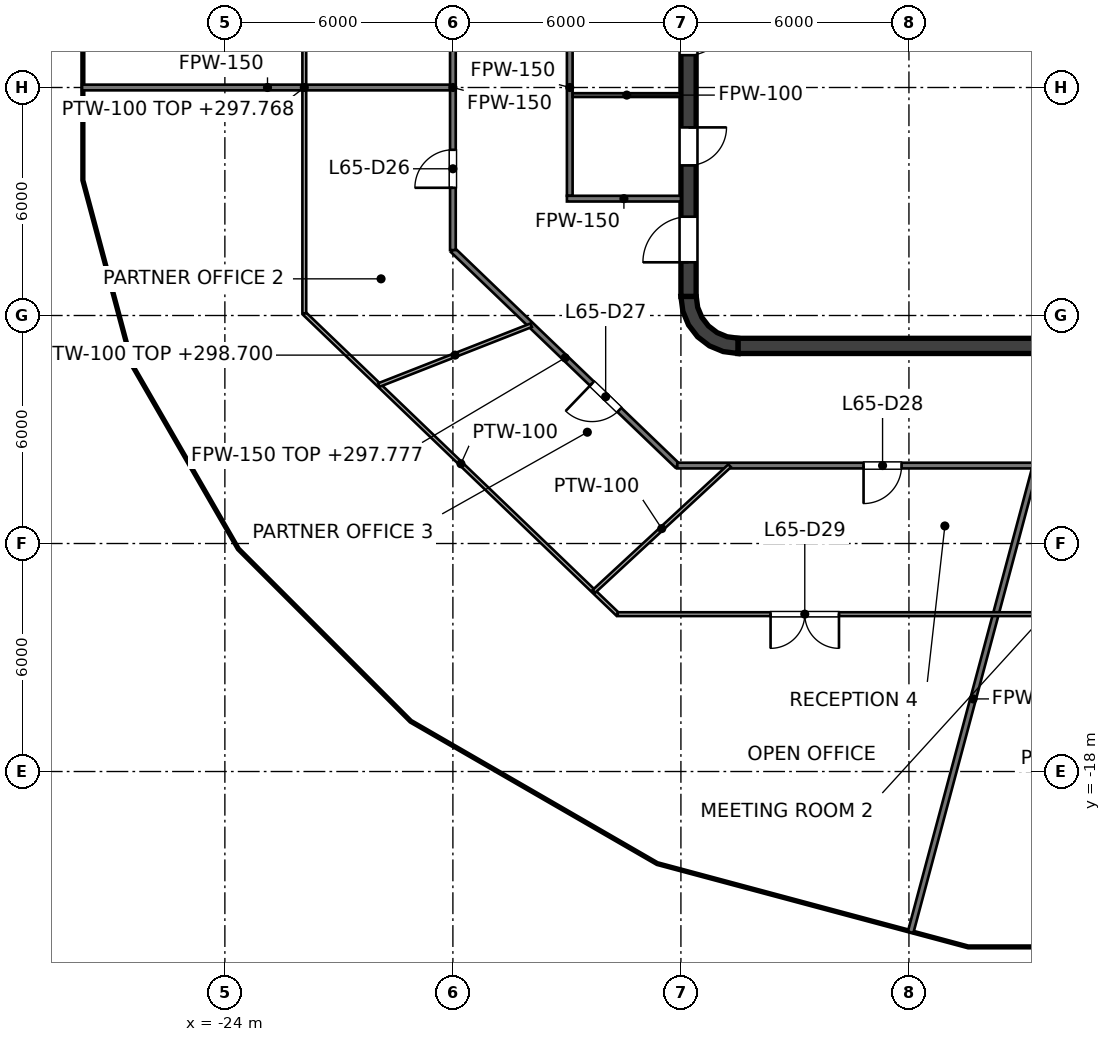
"""IFC4 building model, lengths in metres.
Left out: names, types, materials, properties, quantities, classifications, styles, units other than length and angle.
Written with IfcOpenShell. Run it as: python <this file> out.ifc"""

import sys

from ifc_helpers import new_model, si_unit, direction, frame, frame_2d, origin, place, context, subcontext, project, spatial, polyline, rectangle, outline, extrude, element, fill, save


model = new_model("IFC4")
c1 = context("Model", 3, precision=1e-05, world=origin(), true_north=direction((0.0, 1.0)))
c2 = subcontext(c1, "Body", "Model", "MODEL_VIEW")
j1 = project(units=[si_unit("LENGTHUNIT", "METRE"), si_unit("PLANEANGLEUNIT", "RADIAN")], contexts=[c1])
p1 = place(None, origin())
s1 = spatial("IfcSite", under=j1, at=p1, CompositionType="ELEMENT")
p2 = place(p1, origin())
s2 = spatial("IfcBuilding", under=s1, at=p2, CompositionType="ELEMENT")
p3 = place(p2, frame((0.0, 0.0, 295.0)))
s3 = spatial("IfcBuildingStorey", under=s2, at=p3, CompositionType="ELEMENT", Elevation=295.0)
p4 = place(p3, frame((-10.5, -6.8, 0.0), z_axis=(0.0, 0.0, 1.0), x_axis=(1.0, 0.0, 0.0)))
e1 = element("IfcWall", 1, at=p4, inside=s3, PredefinedType="SHEAR", context=c2, shape_type="SweptSolid", body=[
    extrude(rectangle(XDim=21.0, YDim=0.4, at=frame_2d((10.5, 0.0))), origin(), (0.0, 0.0, 1.0), 4.0),
])
p5 = place(p3, frame((-11.8, -5.5, 0.0), z_axis=(0.0, 0.0, 1.0), x_axis=(0.0, 1.0, 0.0)))
e2 = element("IfcWall", 2, at=p5, inside=s3, PredefinedType="SHEAR", context=c2, shape_type="SweptSolid", body=[
    extrude(rectangle(XDim=11.0, YDim=0.4, at=frame_2d((5.5, 0.0))), origin(), (0.0, 0.0, 1.0), 4.0),
])
p6 = place(p5, frame((3.45, 0.0, 0.0)))
e3 = element("IfcOpeningElement", 3, at=p6, cuts=e2, PredefinedType="OPENING", context=c2, shape_type="SweptSolid", body=[
    extrude(rectangle(XDim=1.0, YDim=2.1, at=frame_2d((0.5, 1.05))), frame((0.0, 0.2, 0.0), z_axis=(0.0, -1.0, 0.0), x_axis=(1.0, 0.0, 0.0)), (0.0, 0.0, 1.0), 0.4),
])
p7 = place(p5, frame((6.35, 0.0, 0.0)))
e4 = element("IfcOpeningElement", 4, at=p7, cuts=e2, PredefinedType="OPENING", context=c2, shape_type="SweptSolid", body=[
    extrude(rectangle(XDim=1.0, YDim=2.1, at=frame_2d((0.5, 1.05))), frame((0.0, 0.2, 0.0), z_axis=(0.0, -1.0, 0.0), x_axis=(1.0, 0.0, 0.0)), (0.0, 0.0, 1.0), 0.4),
])
p8 = place(p5, frame((0.9, 0.0, 0.0)))
e5 = element("IfcOpeningElement", 5, at=p8, cuts=e2, PredefinedType="OPENING", context=c2, shape_type="SweptSolid", body=[
    extrude(rectangle(XDim=1.2, YDim=2.1, at=frame_2d((0.6, 1.05))), frame((0.0, 0.2, 0.0), z_axis=(0.0, -1.0, 0.0), x_axis=(1.0, 0.0, 0.0)), (0.0, 0.0, 1.0), 0.4),
])
p9 = place(p5, frame((8.9, 0.0, 0.0)))
e6 = element("IfcOpeningElement", 6, at=p9, cuts=e2, PredefinedType="OPENING", context=c2, shape_type="SweptSolid", body=[
    extrude(rectangle(XDim=1.2, YDim=2.1, at=frame_2d((0.6, 1.05))), frame((0.0, 0.2, 0.0), z_axis=(0.0, -1.0, 0.0), x_axis=(1.0, 0.0, 0.0)), (0.0, 0.0, 1.0), 0.4),
])
p10 = place(p3, origin())
e7 = element("IfcWall", 7, at=p10, inside=s3, PredefinedType="SHEAR", context=c2, shape_type="SweptSolid", body=[
    extrude(outline(polyline([(-10.5, -7.0), (-10.5, -6.596), (-10.784, -6.559), (-11.048, -6.45), (-11.275, -6.275), (-11.45, -6.048), (-11.559, -5.784), (-11.596, -5.5), (-12.0, -5.5), (-11.949, -5.888), (-11.799, -6.25), (-11.561, -6.561), (-11.25, -6.799), (-10.888, -6.949), (-10.5, -7.0)])), origin(), (0.0, 0.0, 1.0), 4.0),
])
p11 = place(p3, frame((-9.0, -6.6, 0.0), z_axis=(0.0, 0.0, 1.0), x_axis=(0.0, 1.0, 0.0)))
e8 = element("IfcWall", 8, at=p11, inside=s3, PredefinedType="PARTITIONING", context=c2, shape_type="SweptSolid", body=[
    extrude(rectangle(XDim=2.5, YDim=0.25, at=frame_2d((1.25, 0.0))), origin(), (0.0, 0.0, 1.0), 3.7),
])
p12 = place(p11, frame((0.75, 0.0, 0.0)))
e9 = element("IfcOpeningElement", 9, at=p12, cuts=e8, PredefinedType="OPENING", context=c2, shape_type="SweptSolid", body=[
    extrude(rectangle(XDim=1.0, YDim=2.1, at=frame_2d((0.5, 1.05))), frame((0.0, 0.125, 0.0), z_axis=(0.0, -1.0, 0.0), x_axis=(1.0, 0.0, 0.0)), (0.0, 0.0, 1.0), 0.25),
])
p13 = place(p3, frame((-2.9, -6.6, 0.0), z_axis=(0.0, 0.0, 1.0), x_axis=(0.0, 1.0, 0.0)))
e10 = element("IfcWall", 10, at=p13, inside=s3, PredefinedType="PARTITIONING", context=c2, shape_type="SweptSolid", body=[
    extrude(rectangle(XDim=2.5, YDim=0.25, at=frame_2d((1.25, 0.0))), origin(), (0.0, 0.0, 1.0), 3.7),
])
p14 = place(p13, frame((0.8, 0.0, 0.0)))
e11 = element("IfcOpeningElement", 11, at=p14, cuts=e10, PredefinedType="OPENING", context=c2, shape_type="SweptSolid", body=[
    extrude(rectangle(XDim=0.9, YDim=2.1, at=frame_2d((0.45, 1.05))), frame((0.0, 0.125, 0.0), z_axis=(0.0, -1.0, 0.0), x_axis=(1.0, 0.0, 0.0)), (0.0, 0.0, 1.0), 0.25),
])
p15 = place(p3, frame((-9.125, -1.525, 0.0), z_axis=(0.0, 0.0, 1.0), x_axis=(1.0, 0.0, 0.0)))
e12 = element("IfcWall", 12, at=p15, inside=s3, PredefinedType="SOLIDWALL", context=c2, shape_type="SweptSolid", body=[
    extrude(rectangle(XDim=18.25, YDim=0.25, at=frame_2d((9.125, 0.0))), origin(), (0.0, 0.0, 1.0), 3.7),
])
p16 = place(p15, frame((7.15, 0.0, 0.0)))
e13 = element("IfcOpeningElement", 13, at=p16, cuts=e12, PredefinedType="OPENING", context=c2, shape_type="SweptSolid", body=[
    extrude(rectangle(XDim=1.2, YDim=2.1, at=frame_2d((0.6, 1.05))), frame((0.0, 0.125, 0.0), z_axis=(0.0, -1.0, 0.0), x_axis=(1.0, 0.0, 0.0)), (0.0, 0.0, 1.0), 0.25),
])
p17 = place(p15, frame((10.2, 0.0, 0.0)))
e14 = element("IfcOpeningElement", 14, at=p17, cuts=e12, PredefinedType="OPENING", context=c2, shape_type="SweptSolid", body=[
    extrude(rectangle(XDim=1.2, YDim=2.1, at=frame_2d((0.6, 1.05))), frame((0.0, 0.125, 0.0), z_axis=(0.0, -1.0, 0.0), x_axis=(1.0, 0.0, 0.0)), (0.0, 0.0, 1.0), 0.25),
])
p18 = place(p15, frame((16.075, 0.0, 0.0)))
e15 = element("IfcOpeningElement", 15, at=p18, cuts=e12, PredefinedType="OPENING", context=c2, shape_type="SweptSolid", body=[
    extrude(rectangle(XDim=1.0, YDim=2.1, at=frame_2d((0.5, 1.05))), frame((0.0, 0.125, 0.0), z_axis=(0.0, -1.0, 0.0), x_axis=(1.0, 0.0, 0.0)), (0.0, 0.0, 1.0), 0.25),
])
p19 = place(p3, frame((-9.125, -3.975, 0.0), z_axis=(0.0, 0.0, 1.0), x_axis=(1.0, 0.0, 0.0)))
e16 = element("IfcWall", 16, at=p19, inside=s3, PredefinedType="SOLIDWALL", context=c2, shape_type="SweptSolid", body=[
    extrude(rectangle(XDim=12.4, YDim=0.25, at=frame_2d((6.2, 0.0))), origin(), (0.0, 0.0, 1.0), 3.7),
])
p20 = place(p19, frame((1.05, 0.0, 0.0)))
e17 = element("IfcOpeningElement", 17, at=p20, cuts=e16, PredefinedType="OPENING", context=c2, shape_type="SweptSolid", body=[
    extrude(rectangle(XDim=1.2, YDim=2.1, at=frame_2d((0.6, 1.05))), frame((0.0, 0.125, 0.0), z_axis=(0.0, -1.0, 0.0), x_axis=(1.0, 0.0, 0.0)), (0.0, 0.0, 1.0), 0.25),
])
p21 = place(p19, frame((4.1, 0.0, 0.0)))
e18 = element("IfcOpeningElement", 18, at=p21, cuts=e16, PredefinedType="OPENING", context=c2, shape_type="SweptSolid", body=[
    extrude(rectangle(XDim=1.2, YDim=2.1, at=frame_2d((0.6, 1.05))), frame((0.0, 0.125, 0.0), z_axis=(0.0, -1.0, 0.0), x_axis=(1.0, 0.0, 0.0)), (0.0, 0.0, 1.0), 0.25),
])
for number, where, z_axis, x_axis in (
    (19, (-9.0, -3.85, 0.0), (0.0, 0.0, 1.0), (0.0, 1.0, 0.0)),
    (20, (-5.95, -3.85, 0.0), (0.0, 0.0, 1.0), (0.0, 1.0, 0.0)),
    (21, (-2.9, -3.85, 0.0), (0.0, 0.0, 1.0), (0.0, 1.0, 0.0)),
):
    element("IfcWall", number, at=place(p3, frame(where, z_axis=z_axis, x_axis=x_axis)), inside=s3, PredefinedType="SOLIDWALL", context=c2, shape_type="SweptSolid", body=[
        extrude(rectangle(XDim=2.2, YDim=0.25, at=frame_2d((1.1, 0.0))), origin(), (0.0, 0.0, 1.0), 3.7),
    ])
p22 = place(p3, frame((-14.925, -2.85, 0.0), z_axis=(0.0, 0.0, 1.0), x_axis=(0.0, 1.0, 0.0)))
e22 = element("IfcWall", 22, at=p22, inside=s3, PredefinedType="PARTITIONING", context=c2, shape_type="SweptSolid", body=[
    extrude(rectangle(XDim=5.7, YDim=0.15, at=frame_2d((2.85, 0.0))), origin(), (0.0, 0.0, 1.0), 2.768),
])
p23 = place(p3, frame((-15.0, -2.925, 0.0), z_axis=(0.0, 0.0, 1.0), x_axis=(1.0, 0.0, 0.0)))
e23 = element("IfcWall", 23, at=p23, inside=s3, PredefinedType="PARTITIONING", context=c2, shape_type="SweptSolid", body=[
    extrude(rectangle(XDim=3.0, YDim=0.15, at=frame_2d((1.5, 0.0))), origin(), (0.0, 0.0, 1.0), 2.768),
])
p24 = place(p3, frame((-14.85, -0.2, 0.0), z_axis=(0.0, 0.0, 1.0), x_axis=(1.0, 0.0, 0.0)))
e24 = element("IfcWall", 24, at=p24, inside=s3, PredefinedType="PARTITIONING", context=c2, shape_type="SweptSolid", body=[
    extrude(rectangle(XDim=2.85, YDim=0.1, at=frame_2d((1.425, 0.0))), origin(), (0.0, 0.0, 1.0), 2.768),
])
p25 = place(p3, frame((-18.0, -4.278, 0.0), z_axis=(0.0, 0.0, 1.0), x_axis=(0.721290181137, -0.692633001376, 0.0)))
e25 = element("IfcWall", 25, at=p25, inside=s3, PredefinedType="PARTITIONING", context=c2, shape_type="SweptSolid", body=[
    extrude(rectangle(XDim=8.187, YDim=0.15, at=frame_2d((4.094, 0.0))), origin(), (0.0, 0.0, 1.0), 2.777),
])
p26 = place(p25, frame((5.073, 0.0, 0.0)))
e26 = element("IfcOpeningElement", 26, at=p26, cuts=e25, PredefinedType="OPENING", context=c2, shape_type="SweptSolid", body=[
    extrude(rectangle(XDim=1.0, YDim=2.1, at=frame_2d((0.5, 1.05))), frame((0.0, 0.075, 0.0), z_axis=(0.0, -1.0, 0.0), x_axis=(1.0, 0.0, 0.0)), (0.0, 0.0, 1.0), 0.15),
])
p27 = place(p3, frame((-12.095, -9.949, 0.0), z_axis=(0.0, 0.0, 1.0), x_axis=(1.0, 0.0, 0.0)))
e27 = element("IfcWall", 27, at=p27, inside=s3, PredefinedType="PARTITIONING", context=c2, shape_type="SweptSolid", body=[
    extrude(rectangle(XDim=24.19, YDim=0.15, at=frame_2d((12.095, 0.0))), origin(), (0.0, 0.0, 1.0), 2.768),
])
p28 = place(p27, frame((4.901, 0.0, 0.0)))
e28 = element("IfcOpeningElement", 28, at=p28, cuts=e27, PredefinedType="OPENING", context=c2, shape_type="SweptSolid", body=[
    extrude(rectangle(XDim=1.0, YDim=2.1, at=frame_2d((0.5, 1.05))), frame((0.0, 0.075, 0.0), z_axis=(0.0, -1.0, 0.0), x_axis=(1.0, 0.0, 0.0)), (0.0, 0.0, 1.0), 0.15),
])
p29 = place(p27, frame((11.05, 0.0, 0.0)))
e29 = element("IfcOpeningElement", 29, at=p29, cuts=e27, PredefinedType="OPENING", context=c2, shape_type="SweptSolid", body=[
    extrude(rectangle(XDim=1.0, YDim=2.1, at=frame_2d((0.5, 1.05))), frame((0.0, 0.075, 0.0), z_axis=(0.0, -1.0, 0.0), x_axis=(1.0, 0.0, 0.0)), (0.0, 0.0, 1.0), 0.15),
])
p30 = place(p27, frame((17.307, 0.0, 0.0)))
e30 = element("IfcOpeningElement", 30, at=p30, cuts=e27, PredefinedType="OPENING", context=c2, shape_type="SweptSolid", body=[
    extrude(rectangle(XDim=1.0, YDim=2.1, at=frame_2d((0.5, 1.05))), frame((0.0, 0.075, 0.0), z_axis=(0.0, -1.0, 0.0), x_axis=(1.0, 0.0, 0.0)), (0.0, 0.0, 1.0), 0.15),
])
p31 = place(p3, frame((-27.757, 0.0, 0.0), z_axis=(0.0, 0.0, 1.0), x_axis=(1.0, 0.0, 0.0)))
e31 = element("IfcWall", 31, at=p31, inside=s3, PredefinedType="PARTITIONING", context=c2, shape_type="SweptSolid", body=[
    extrude(rectangle(XDim=9.757, YDim=0.15, at=frame_2d((4.878, 0.0))), origin(), (0.0, 0.0, 1.0), 2.768),
])
p32 = place(p3, frame((-5.956, -22.23, 0.0), z_axis=(0.0, 0.0, 1.0), x_axis=(0.258735765276, 0.965948137204, 0.0)))
e32 = element("IfcWall", 32, at=p32, inside=s3, PredefinedType="PARTITIONING", context=c2, shape_type="SweptSolid", body=[
    extrude(rectangle(XDim=12.714, YDim=0.15, at=frame_2d((6.357, 0.0))), origin(), (0.0, 0.0, 1.0), 3.152),
])
p33 = place(p3, frame((-18.0, -4.278, 0.0), z_axis=(0.0, 0.0, 1.0), x_axis=(0.0, 1.0, 0.0)))
e33 = element("IfcWall", 33, at=p33, inside=s3, PredefinedType="PARTITIONING", context=c2, shape_type="SweptSolid", body=[
    extrude(rectangle(XDim=8.556, YDim=0.15, at=frame_2d((4.278, 0.0))), origin(), (0.0, 0.0, 1.0), 2.768),
])
p34 = place(p33, frame((1.639, 0.0, 0.0)))
e34 = element("IfcOpeningElement", 34, at=p34, cuts=e33, PredefinedType="OPENING", context=c2, shape_type="SweptSolid", body=[
    extrude(rectangle(XDim=1.0, YDim=2.1, at=frame_2d((0.5, 1.05))), frame((0.0, 0.075, 0.0), z_axis=(0.0, -1.0, 0.0), x_axis=(1.0, 0.0, 0.0)), (0.0, 0.0, 1.0), 0.15),
])
p35 = place(p3, frame((-21.91, -5.944, 0.0), z_axis=(0.0, 0.0, 1.0), x_axis=(0.721286980933, -0.692636333971, 0.0)))
e35 = element("IfcWall", 35, at=p35, inside=s3, PredefinedType="PARTITIONING", context=c2, shape_type="SweptSolid", body=[
    extrude(rectangle(XDim=11.427, YDim=0.1, at=frame_2d((5.713, 0.0))), origin(), (0.0, 0.0, 1.0), 2.777),
])
p36 = place(p3, frame((-13.668, -13.859, 0.0), z_axis=(0.0, 0.0, 1.0), x_axis=(1.0, 0.0, 0.0)))
e36 = element("IfcWall", 36, at=p36, inside=s3, PredefinedType="PARTITIONING", context=c2, shape_type="SweptSolid", body=[
    extrude(rectangle(XDim=27.336, YDim=0.1, at=frame_2d((13.668, 0.0))), origin(), (0.0, 0.0, 1.0), 2.768),
])
p37 = place(p36, frame((4.027, 0.0, 0.0)))
e37 = element("IfcOpeningElement", 37, at=p37, cuts=e36, PredefinedType="OPENING", context=c2, shape_type="SweptSolid", body=[
    extrude(rectangle(XDim=1.8, YDim=2.1, at=frame_2d((0.9, 1.05))), frame((0.0, 0.05, 0.0), z_axis=(0.0, -1.0, 0.0), x_axis=(1.0, 0.0, 0.0)), (0.0, 0.0, 1.0), 0.1),
])
p38 = place(p36, frame((20.699, 0.0, 0.0)))
e38 = element("IfcOpeningElement", 38, at=p38, cuts=e36, PredefinedType="OPENING", context=c2, shape_type="SweptSolid", body=[
    extrude(rectangle(XDim=1.8, YDim=2.1, at=frame_2d((0.9, 1.05))), frame((0.0, 0.05, 0.0), z_axis=(0.0, -1.0, 0.0), x_axis=(1.0, 0.0, 0.0)), (0.0, 0.0, 1.0), 0.1),
])
p39 = place(p3, frame((-19.947, -7.829, 0.0), z_axis=(0.0, 0.0, 1.0), x_axis=(0.930847279984, 0.36540845823, 0.0)))
e39 = element("IfcWall", 39, at=p39, inside=s3, PredefinedType="PARTITIONING", context=c2, shape_type="SweptSolid", body=[
    extrude(rectangle(XDim=4.305, YDim=0.1, at=frame_2d((2.152, 0.0))), origin(), (0.0, 0.0, 1.0), 3.7),
])
p40 = place(p3, frame((-14.291, -13.261, 0.0), z_axis=(0.0, 0.0, 1.0), x_axis=(0.733905079576, 0.679252040242, 0.0)))
e40 = element("IfcWall", 40, at=p40, inside=s3, PredefinedType="PARTITIONING", context=c2, shape_type="SweptSolid", body=[
    extrude(rectangle(XDim=4.869, YDim=0.1, at=frame_2d((2.435, 0.0))), origin(), (0.0, 0.0, 1.0), 2.777),
])
p41 = place(p3, frame((-21.91, -5.944, 0.0), z_axis=(0.0, 0.0, 1.0), x_axis=(0.0, 1.0, 0.0)))
e41 = element("IfcWall", 41, at=p41, inside=s3, PredefinedType="PARTITIONING", context=c2, shape_type="SweptSolid", body=[
    extrude(rectangle(XDim=11.888, YDim=0.1, at=frame_2d((5.944, 0.0))), origin(), (0.0, 0.0, 1.0), 2.768),
])
p42 = place(p20, origin())
e42 = element("IfcDoor", 42, at=p42, inside=s3, OperationType="DOUBLE_DOOR_SLIDING", PredefinedType="DOOR", context=c2, shape_type="SweptSolid", body=[
    extrude(rectangle(XDim=1.2, YDim=2.1, at=frame_2d((0.6, 1.05))), frame((0.0, 0.025, 0.0), z_axis=(0.0, -1.0, 0.0), x_axis=(1.0, 0.0, 0.0)), (0.0, 0.0, 1.0), 0.05),
])
fill(e17, e42)
p43 = place(p21, origin())
e43 = element("IfcDoor", 43, at=p43, inside=s3, OperationType="DOUBLE_DOOR_SLIDING", PredefinedType="DOOR", context=c2, shape_type="SweptSolid", body=[
    extrude(rectangle(XDim=1.2, YDim=2.1, at=frame_2d((0.6, 1.05))), frame((0.0, 0.025, 0.0), z_axis=(0.0, -1.0, 0.0), x_axis=(1.0, 0.0, 0.0)), (0.0, 0.0, 1.0), 0.05),
])
fill(e18, e43)
p44 = place(p12, origin())
e44 = element("IfcDoor", 44, at=p44, inside=s3, OperationType="SINGLE_SWING_LEFT", PredefinedType="DOOR", context=c2, shape_type="SweptSolid", body=[
    extrude(rectangle(XDim=1.0, YDim=2.1, at=frame_2d((0.5, 1.05))), frame((0.0, 0.025, 0.0), z_axis=(0.0, -1.0, 0.0), x_axis=(1.0, 0.0, 0.0)), (0.0, 0.0, 1.0), 0.05),
])
fill(e9, e44)
p45 = place(p14, origin())
e45 = element("IfcDoor", 45, at=p45, inside=s3, OperationType="SINGLE_SWING_RIGHT", PredefinedType="DOOR", context=c2, shape_type="SweptSolid", body=[
    extrude(rectangle(XDim=0.9, YDim=2.1, at=frame_2d((0.45, 1.05))), frame((0.0, 0.025, 0.0), z_axis=(0.0, -1.0, 0.0), x_axis=(1.0, 0.0, 0.0)), (0.0, 0.0, 1.0), 0.05),
])
fill(e11, e45)
p46 = place(p6, origin())
e46 = element("IfcDoor", 46, at=p46, inside=s3, OperationType="SINGLE_SWING_RIGHT", PredefinedType="DOOR", context=c2, shape_type="SweptSolid", body=[
    extrude(rectangle(XDim=1.0, YDim=2.1, at=frame_2d((0.5, 1.05))), frame((0.0, 0.025, 0.0), z_axis=(0.0, -1.0, 0.0), x_axis=(1.0, 0.0, 0.0)), (0.0, 0.0, 1.0), 0.05),
])
fill(e3, e46)
p47 = place(p7, origin())
e47 = element("IfcDoor", 47, at=p47, inside=s3, OperationType="SINGLE_SWING_RIGHT", PredefinedType="DOOR", context=c2, shape_type="SweptSolid", body=[
    extrude(rectangle(XDim=1.0, YDim=2.1, at=frame_2d((0.5, 1.05))), frame((0.0, 0.025, 0.0), z_axis=(0.0, -1.0, 0.0), x_axis=(1.0, 0.0, 0.0)), (0.0, 0.0, 1.0), 0.05),
])
fill(e4, e47)
p48 = place(p8, origin())
e48 = element("IfcDoor", 48, at=p48, inside=s3, OperationType="SINGLE_SWING_LEFT", PredefinedType="DOOR", context=c2, shape_type="SweptSolid", body=[
    extrude(rectangle(XDim=1.2, YDim=2.1, at=frame_2d((0.6, 1.05))), frame((0.0, 0.025, 0.0), z_axis=(0.0, -1.0, 0.0), x_axis=(1.0, 0.0, 0.0)), (0.0, 0.0, 1.0), 0.05),
])
fill(e5, e48)
p49 = place(p34, origin())
e49 = element("IfcDoor", 49, at=p49, inside=s3, OperationType="SINGLE_SWING_LEFT", PredefinedType="DOOR", context=c2, shape_type="SweptSolid", body=[
    extrude(rectangle(XDim=1.0, YDim=2.1, at=frame_2d((0.5, 1.05))), frame((0.0, 0.025, 0.0), z_axis=(0.0, -1.0, 0.0), x_axis=(1.0, 0.0, 0.0)), (0.0, 0.0, 1.0), 0.05),
])
fill(e34, e49)
p50 = place(p26, origin())
e50 = element("IfcDoor", 50, at=p50, inside=s3, OperationType="SINGLE_SWING_LEFT", PredefinedType="DOOR", context=c2, shape_type="SweptSolid", body=[
    extrude(rectangle(XDim=1.0, YDim=2.1, at=frame_2d((0.5, 1.05))), frame((0.0, 0.025, 0.0), z_axis=(0.0, -1.0, 0.0), x_axis=(1.0, 0.0, 0.0)), (0.0, 0.0, 1.0), 0.05),
])
fill(e26, e50)
p51 = place(p28, origin())
e51 = element("IfcDoor", 51, at=p51, inside=s3, OperationType="SINGLE_SWING_LEFT", PredefinedType="DOOR", context=c2, shape_type="SweptSolid", body=[
    extrude(rectangle(XDim=1.0, YDim=2.1, at=frame_2d((0.5, 1.05))), frame((0.0, 0.025, 0.0), z_axis=(0.0, -1.0, 0.0), x_axis=(1.0, 0.0, 0.0)), (0.0, 0.0, 1.0), 0.05),
])
fill(e28, e51)
p52 = place(p37, origin())
e52 = element("IfcDoor", 52, at=p52, inside=s3, OperationType="DOUBLE_DOOR_SINGLE_SWING", PredefinedType="DOOR", context=c2, shape_type="SweptSolid", body=[
    extrude(rectangle(XDim=1.8, YDim=2.1, at=frame_2d((0.9, 1.05))), frame((0.0, 0.025, 0.0), z_axis=(0.0, -1.0, 0.0), x_axis=(1.0, 0.0, 0.0)), (0.0, 0.0, 1.0), 0.05),
])
fill(e37, e52)
save(model, sys.argv[1])
